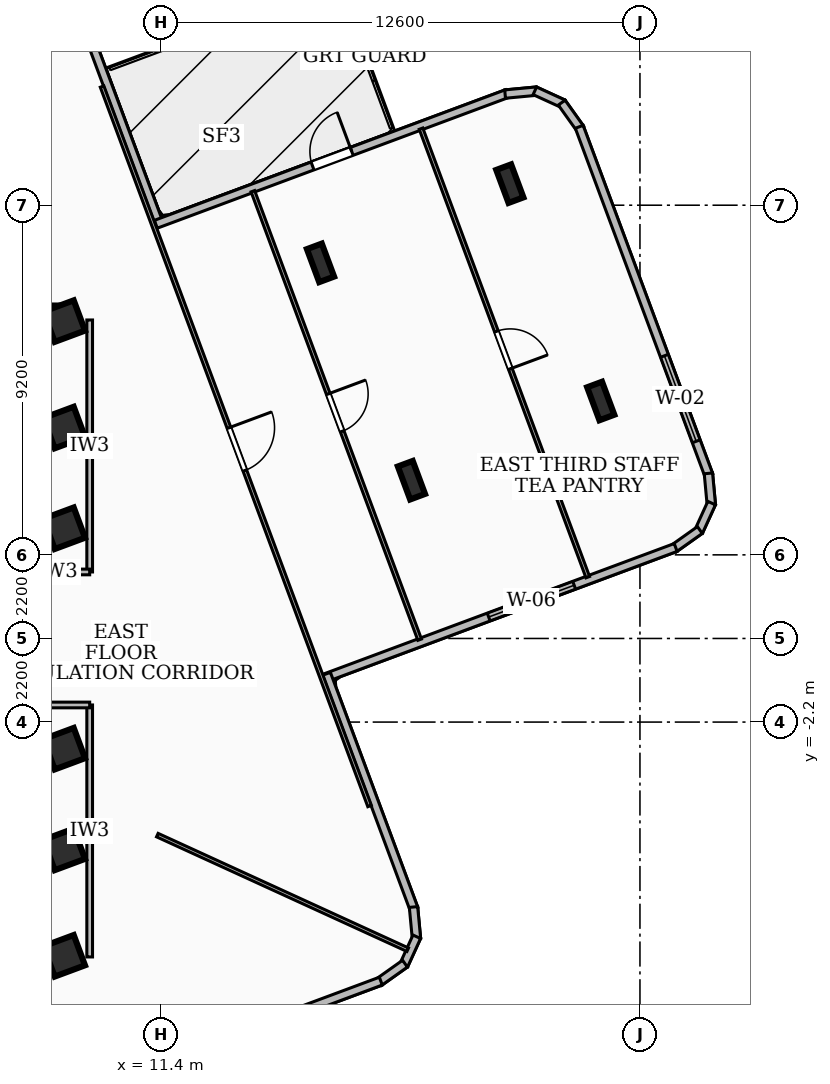
"""IFC4 building model, lengths in metres.
Left out: names, types, materials, properties, quantities, classifications, styles, units other than length and angle.
Written with IfcOpenShell. Run it as: python <this file> out.ifc"""

import sys

from ifc_helpers import new_model, si_unit, direction, frame, frame_2d, origin, origin_2d, place, context, subcontext, project, spatial, rectangle, i_section, extrude, element, fill, save


model = new_model("IFC4")
c1 = context("Model", 3, precision=1e-05, world=origin(), true_north=direction((0.0, 1.0)))
c2 = subcontext(c1, "Body", "Model", "MODEL_VIEW")
j1 = project(units=[si_unit("LENGTHUNIT", "METRE"), si_unit("PLANEANGLEUNIT", "RADIAN")], contexts=[c1])
p1 = place(None, origin())
s1 = spatial("IfcSite", under=j1, at=p1, CompositionType="ELEMENT")
p2 = place(p1, origin())
s2 = spatial("IfcBuilding", under=s1, at=p2, CompositionType="ELEMENT")
p3 = place(p2, frame((0.0, 0.0, 166.68)))
s3 = spatial("IfcBuildingStorey", under=s2, at=p3, CompositionType="ELEMENT", Elevation=166.68)
for number, where, z_axis, x_axis in (
    (1, (-8.78, 8.535, 0.0), (0.0, 0.0, 1.0), (1.0, 0.0, 0.0)),
    (2, (8.78, -8.535, 0.0), (0.0, 0.0, 1.0), (-1.0, 0.0, 0.0)),
):
    element("IfcWall", number, at=place(p3, frame(where, z_axis=z_axis, x_axis=x_axis)), inside=s3, PredefinedType="SHEAR", context=c2, shape_type="SweptSolid", body=[
        extrude(rectangle(XDim=17.56, YDim=0.45, at=frame_2d((8.78, 0.0))), origin(), (0.0, 0.0, 1.0), 3.34),
    ])
for number, where, z_axis, x_axis in (
    (3, (8.85, -5.55, 0.0), (0.0, 0.0, 1.0), (0.937, 0.349, 0.0)),
    (4, (8.85, -2.9, 0.0), (0.0, 0.0, 1.0), (0.937, 0.349, 0.0)),
    (5, (8.85, 2.9, 0.0), (0.0, 0.0, 1.0), (0.937, 0.349, 0.0)),
    (6, (8.85, 5.55, 0.0), (0.0, 0.0, 1.0), (0.937, 0.349, 0.0)),
    (7, (8.85, -8.35, 0.0), (0.0, 0.0, 1.0), (0.937, 0.349, 0.0)),
    (8, (8.85, 8.35, 0.0), (0.0, 0.0, 1.0), (0.937, 0.349, 0.0)),
):
    element("IfcColumn", number, at=place(p3, frame(where, z_axis=z_axis, x_axis=x_axis)), inside=s3, PredefinedType="COLUMN", context=c2, shape_type="SweptSolid", body=[
        extrude(rectangle(XDim=0.85, YDim=0.85, at=origin_2d()), origin(), (0.0, 0.0, 1.0), 3.6),
    ])
for number, where, z_axis, x_axis in (
    (9, (17.987, 4.164, 0.0), (0.0, 0.0, 1.0), (0.937, 0.349, 0.0)),
    (10, (15.594, 9.883, 0.0), (0.0, 0.0, 1.0), (0.937, 0.349, 0.0)),
    (11, (22.968, 6.248, 0.0), (0.0, 0.0, 1.0), (0.937, 0.349, 0.0)),
    (12, (20.576, 11.967, 0.0), (0.0, 0.0, 1.0), (0.937, 0.349, 0.0)),
):
    element("IfcColumn", number, at=place(p3, frame(where, z_axis=z_axis, x_axis=x_axis)), inside=s3, PredefinedType="COLUMN", context=c2, shape_type="SweptSolid", body=[
        extrude(i_section(OverallWidth=0.418, OverallDepth=0.927, WebThickness=0.019, FlangeThickness=0.032, at=origin_2d()), origin(), (0.0, 0.0, 1.0), 3.6),
    ])
p4 = place(p3, frame((9.016, 17.181, 0.0), z_axis=(0.0, 0.0, 1.0), x_axis=(0.34874699486, -0.937216908499, 0.0)))
e13 = element("IfcWall", 13, at=p4, inside=s3, PredefinedType="SOLIDWALL", context=c2, shape_type="SweptSolid", body=[
    extrude(rectangle(XDim=6.758, YDim=0.22, at=frame_2d((3.379, 0.0))), origin(), (0.0, 0.0, 1.0), 2.644),
])
p5 = place(p3, frame((11.26, 10.898, 0.0), z_axis=(0.0, 0.0, 1.0), x_axis=(0.937247074189, 0.348665917354, 0.0)))
e14 = element("IfcWall", 14, at=p5, inside=s3, PredefinedType="SOLIDWALL", context=c2, shape_type="SweptSolid", body=[
    extrude(rectangle(XDim=9.858, YDim=0.22, at=frame_2d((4.929, 0.0))), origin(), (0.0, 0.0, 1.0), 2.644),
])
p6 = place(p5, frame((4.4, 0.0, 0.0)))
e15 = element("IfcOpeningElement", 15, at=p6, cuts=e14, PredefinedType="OPENING", context=c2, shape_type="SweptSolid", body=[
    extrude(rectangle(XDim=1.1, YDim=2.1, at=frame_2d((0.55, 1.05))), frame((0.0, 0.12, 0.0), z_axis=(0.0, -1.0, 0.0), x_axis=(1.0, 0.0, 0.0)), (0.0, 0.0, 1.0), 0.24),
])
p7 = place(p3, frame((20.451, 14.324, 0.0), z_axis=(0.0, 0.0, 1.0), x_axis=(0.99561041007, 0.093594398126, 0.0)))
e16 = element("IfcWall", 16, at=p7, inside=s3, PredefinedType="SOLIDWALL", context=c2, shape_type="SweptSolid", body=[
    extrude(rectangle(XDim=0.835, YDim=0.22, at=frame_2d((0.417, 0.0))), origin(), (0.0, 0.0, 1.0), 3.34),
])
p8 = place(p3, frame((21.234, 14.41, 0.0), z_axis=(0.0, 0.0, 1.0), x_axis=(0.909384320786, -0.415956917371, 0.0)))
e17 = element("IfcWall", 17, at=p8, inside=s3, PredefinedType="SOLIDWALL", context=c2, shape_type="SweptSolid", body=[
    extrude(rectangle(XDim=0.819, YDim=0.22, at=frame_2d((0.41, 0.0))), origin(), (0.0, 0.0, 1.0), 3.34),
])
p9 = place(p3, frame((21.941, 14.099, 0.0), z_axis=(0.0, 0.0, 1.0), x_axis=(0.581210523844, -0.813753234693, 0.0)))
e18 = element("IfcWall", 18, at=p9, inside=s3, PredefinedType="SOLIDWALL", context=c2, shape_type="SweptSolid", body=[
    extrude(rectangle(XDim=0.835, YDim=0.22, at=frame_2d((0.417, 0.0))), origin(), (0.0, 0.0, 1.0), 3.34),
])
p10 = place(p3, frame((22.402, 13.463, 0.0), z_axis=(0.0, 0.0, 1.0), x_axis=(0.348638358175, -0.937257326037, 0.0)))
e19 = element("IfcWall", 19, at=p10, inside=s3, PredefinedType="SOLIDWALL", context=c2, shape_type="SweptSolid", body=[
    extrude(rectangle(XDim=9.781, YDim=0.22, at=frame_2d((4.89, 0.0))), origin(), (0.0, 0.0, 1.0), 3.34),
])
p11 = place(p10, frame((6.429, 0.0, 0.85)))
e20 = element("IfcOpeningElement", 20, at=p11, cuts=e19, PredefinedType="OPENING", context=c2, shape_type="SweptSolid", body=[
    extrude(rectangle(XDim=2.4, YDim=2.1, at=frame_2d((1.2, 1.05))), frame((0.0, 0.12, 0.0), z_axis=(0.0, -1.0, 0.0), x_axis=(1.0, 0.0, 0.0)), (0.0, 0.0, 1.0), 0.24),
])
p12 = place(p3, frame((25.801, 4.344, 0.0), z_axis=(0.0, 0.0, 1.0), x_axis=(0.09225198338, -0.995735693627, 0.0)))
e21 = element("IfcWall", 21, at=p12, inside=s3, PredefinedType="SOLIDWALL", context=c2, shape_type="SweptSolid", body=[
    extrude(rectangle(XDim=0.834, YDim=0.22, at=frame_2d((0.417, 0.0))), origin(), (0.0, 0.0, 1.0), 3.34),
])
p13 = place(p3, frame((25.886, 3.562, 0.0), z_axis=(0.0, 0.0, 1.0), x_axis=(-0.41476734413, -0.909927497245, 0.0)))
e22 = element("IfcWall", 22, at=p13, inside=s3, PredefinedType="SOLIDWALL", context=c2, shape_type="SweptSolid", body=[
    extrude(rectangle(XDim=0.82, YDim=0.22, at=frame_2d((0.41, 0.0))), origin(), (0.0, 0.0, 1.0), 3.34),
])
p14 = place(p3, frame((25.576, 2.853, 0.0), z_axis=(0.0, 0.0, 1.0), x_axis=(-0.815453569677, -0.578822490666, 0.0)))
e23 = element("IfcWall", 23, at=p14, inside=s3, PredefinedType="SOLIDWALL", context=c2, shape_type="SweptSolid", body=[
    extrude(rectangle(XDim=0.833, YDim=0.22, at=frame_2d((0.416, 0.0))), origin(), (0.0, 0.0, 1.0), 3.34),
])
p15 = place(p3, frame((24.94, 2.394, 0.0), z_axis=(0.0, 0.0, 1.0), x_axis=(-0.937259115868, -0.348633546468, 0.0)))
e24 = element("IfcWall", 24, at=p15, inside=s3, PredefinedType="SOLIDWALL", context=c2, shape_type="SweptSolid", body=[
    extrude(rectangle(XDim=9.859, YDim=0.22, at=frame_2d((4.929, 0.0))), origin(), (0.0, 0.0, 1.0), 3.34),
])
p16 = place(p15, frame((2.85, 0.0, 0.85)))
e25 = element("IfcOpeningElement", 25, at=p16, cuts=e24, PredefinedType="OPENING", context=c2, shape_type="SweptSolid", body=[
    extrude(rectangle(XDim=2.4, YDim=1.85, at=frame_2d((1.2, 0.925))), frame((0.0, 0.12, 0.0), z_axis=(0.0, -1.0, 0.0), x_axis=(1.0, 0.0, 0.0)), (0.0, 0.0, 1.0), 0.24),
])
p17 = place(p3, frame((15.751, -0.93, 0.0), z_axis=(0.0, 0.0, 1.0), x_axis=(0.348729932868, -0.937223257246, 0.0)))
e26 = element("IfcWall", 26, at=p17, inside=s3, PredefinedType="SOLIDWALL", context=c2, shape_type="SweptSolid", body=[
    extrude(rectangle(XDim=6.598, YDim=0.22, at=frame_2d((3.299, 0.0))), origin(), (0.0, 0.0, 1.0), 3.34),
])
p18 = place(p3, frame((18.041, -7.066, 0.0), z_axis=(0.0, 0.0, 1.0), x_axis=(0.09330446586, -0.995637623159, 0.0)))
e27 = element("IfcWall", 27, at=p18, inside=s3, PredefinedType="SOLIDWALL", context=c2, shape_type="SweptSolid", body=[
    extrude(rectangle(XDim=0.835, YDim=0.22, at=frame_2d((0.417, 0.0))), origin(), (0.0, 0.0, 1.0), 3.34),
])
p19 = place(p3, frame((18.127, -7.849, 0.0), z_axis=(0.0, 0.0, 1.0), x_axis=(-0.415083126143, -0.909783489843, 0.0)))
e28 = element("IfcWall", 28, at=p19, inside=s3, PredefinedType="SOLIDWALL", context=c2, shape_type="SweptSolid", body=[
    extrude(rectangle(XDim=0.819, YDim=0.22, at=frame_2d((0.409, 0.0))), origin(), (0.0, 0.0, 1.0), 3.34),
])
p20 = place(p3, frame((17.817, -8.557, 0.0), z_axis=(0.0, 0.0, 1.0), x_axis=(-0.815315167698, -0.579017424022, 0.0)))
e29 = element("IfcWall", 29, at=p20, inside=s3, PredefinedType="SOLIDWALL", context=c2, shape_type="SweptSolid", body=[
    extrude(rectangle(XDim=0.833, YDim=0.22, at=frame_2d((0.417, 0.0))), origin(), (0.0, 0.0, 1.0), 3.34),
])
p21 = place(p3, frame((17.181, -9.016, 0.0), z_axis=(0.0, 0.0, 1.0), x_axis=(-0.937216908499, -0.34874699486, 0.0)))
e30 = element("IfcWall", 30, at=p21, inside=s3, PredefinedType="SOLIDWALL", context=c2, shape_type="SweptSolid", body=[
    extrude(rectangle(XDim=6.758, YDim=0.22, at=frame_2d((3.379, 0.0))), origin(), (0.0, 0.0, 1.0), 3.34),
])
p22 = place(p3, frame((9.52, 1.75, 0.0), z_axis=(0.0, 0.0, 1.0), x_axis=(0.0, 1.0, 0.0)))
e31 = element("IfcWall", 31, at=p22, inside=s3, PredefinedType="PARTITIONING", context=c2, shape_type="SweptSolid", body=[
    extrude(rectangle(XDim=6.63, YDim=0.15, at=frame_2d((3.315, 0.0))), origin(), (0.0, 0.0, 1.0), 2.644),
])
p23 = place(p3, frame((7.85, 1.75, 0.0), z_axis=(0.0, 0.0, 1.0), x_axis=(1.0, 0.0, 0.0)))
e32 = element("IfcWall", 32, at=p23, inside=s3, PredefinedType="PARTITIONING", context=c2, shape_type="SweptSolid", body=[
    extrude(rectangle(XDim=1.67, YDim=0.15, at=frame_2d((0.835, 0.0))), origin(), (0.0, 0.0, 1.0), 2.57),
])
p24 = place(p3, frame((9.52, -8.38, 0.0), z_axis=(0.0, 0.0, 1.0), x_axis=(0.0, 1.0, 0.0)))
e33 = element("IfcWall", 33, at=p24, inside=s3, PredefinedType="PARTITIONING", context=c2, shape_type="SweptSolid", body=[
    extrude(rectangle(XDim=6.63, YDim=0.15, at=frame_2d((3.315, 0.0))), origin(), (0.0, 0.0, 1.0), 3.34),
])
p25 = place(p3, frame((7.85, -1.75, 0.0), z_axis=(0.0, 0.0, 1.0), x_axis=(1.0, 0.0, 0.0)))
e34 = element("IfcWall", 34, at=p25, inside=s3, PredefinedType="PARTITIONING", context=c2, shape_type="SweptSolid", body=[
    extrude(rectangle(XDim=1.67, YDim=0.15, at=frame_2d((0.835, 0.0))), origin(), (0.0, 0.0, 1.0), 2.57),
])
p26 = place(p3, frame((11.3, -5.174, 0.0), z_axis=(0.0, 0.0, 1.0), x_axis=(0.909275268701, -0.416195249528, 0.0)))
e35 = element("IfcWall", 35, at=p26, inside=s3, PredefinedType="PARTITIONING", context=c2, shape_type="SweptSolid", body=[
    extrude(rectangle(XDim=7.246, YDim=0.1, at=frame_2d((3.623, 0.0))), origin(), (0.0, 0.0, 1.0), 3.34),
])
p27 = place(p3, frame((9.846, 14.522, 0.0), z_axis=(0.0, 0.0, 1.0), x_axis=(0.348543090668, -0.937292757866, 0.0)))
e36 = element("IfcWall", 36, at=p27, inside=s3, PredefinedType="PARTITIONING", context=c2, shape_type="SweptSolid", body=[
    extrude(rectangle(XDim=20.198, YDim=0.1, at=frame_2d((10.099, 0.0))), origin(), (0.0, 0.0, 1.0), 2.644),
])
p28 = place(p27, frame((9.579, 0.0, 0.0)))
e37 = element("IfcOpeningElement", 37, at=p28, cuts=e36, PredefinedType="OPENING", context=c2, shape_type="SweptSolid", body=[
    extrude(rectangle(XDim=1.2, YDim=2.1, at=frame_2d((0.6, 1.05))), frame((0.0, 0.06, 0.0), z_axis=(0.0, -1.0, 0.0), x_axis=(1.0, 0.0, 0.0)), (0.0, 0.0, 1.0), 0.12),
])
p29 = place(p3, frame((13.814, 11.768, 0.0), z_axis=(0.0, 0.0, 1.0), x_axis=(0.348608135993, -0.937268567445, 0.0)))
e38 = element("IfcWall", 38, at=p29, inside=s3, PredefinedType="PARTITIONING", context=c2, shape_type="SweptSolid", body=[
    extrude(rectangle(XDim=12.59, YDim=0.1, at=frame_2d((6.295, 0.0))), origin(), (0.0, 0.0, 1.0), 2.644),
])
p30 = place(p29, frame((5.69, 0.0, 0.0)))
e39 = element("IfcOpeningElement", 39, at=p30, cuts=e38, PredefinedType="OPENING", context=c2, shape_type="SweptSolid", body=[
    extrude(rectangle(XDim=1.05, YDim=2.08, at=frame_2d((0.525, 1.04))), frame((0.0, 0.06, 0.0), z_axis=(0.0, -1.0, 0.0), x_axis=(1.0, 0.0, 0.0)), (0.0, 0.0, 1.0), 0.12),
])
p31 = place(p3, frame((18.239, 13.414, 0.0), z_axis=(0.0, 0.0, 1.0), x_axis=(0.348514653153, -0.937303332192, 0.0)))
e40 = element("IfcWall", 40, at=p31, inside=s3, PredefinedType="PARTITIONING", context=c2, shape_type="SweptSolid", body=[
    extrude(rectangle(XDim=12.59, YDim=0.1, at=frame_2d((6.295, 0.0))), origin(), (0.0, 0.0, 1.0), 2.644),
])
p32 = place(p31, frame((5.691, 0.0, 0.0)))
e41 = element("IfcOpeningElement", 41, at=p32, cuts=e40, PredefinedType="OPENING", context=c2, shape_type="SweptSolid", body=[
    extrude(rectangle(XDim=1.05, YDim=2.08, at=frame_2d((0.525, 1.04))), frame((0.0, 0.06, 0.0), z_axis=(0.0, -1.0, 0.0), x_axis=(1.0, 0.0, 0.0)), (0.0, 0.0, 1.0), 0.12),
])
p33 = place(p6, origin())
e42 = element("IfcDoor", 42, at=p33, inside=s3, OperationType="SINGLE_SWING_RIGHT", PredefinedType="DOOR", context=c2, shape_type="SweptSolid", body=[
    extrude(rectangle(XDim=1.1, YDim=2.1, at=frame_2d((0.55, 1.05))), frame((0.0, 0.025, 0.0), z_axis=(0.0, -1.0, 0.0), x_axis=(1.0, 0.0, 0.0)), (0.0, 0.0, 1.0), 0.05),
])
fill(e15, e42)
p34 = place(p11, origin())
e43 = element("IfcWindow", 43, at=p34, inside=s3, PartitioningType="SINGLE_PANEL", PredefinedType="WINDOW", context=c2, shape_type="SweptSolid", body=[
    extrude(rectangle(XDim=2.4, YDim=2.1, at=frame_2d((1.2, 1.05))), frame((0.0, 0.03, 0.0), z_axis=(0.0, -1.0, 0.0), x_axis=(1.0, 0.0, 0.0)), (0.0, 0.0, 1.0), 0.06),
])
fill(e20, e43)
p35 = place(p16, origin())
e44 = element("IfcWindow", 44, at=p35, inside=s3, PartitioningType="SINGLE_PANEL", PredefinedType="WINDOW", context=c2, shape_type="SweptSolid", body=[
    extrude(rectangle(XDim=2.4, YDim=1.85, at=frame_2d((1.2, 0.925))), frame((0.0, 0.03, 0.0), z_axis=(0.0, -1.0, 0.0), x_axis=(1.0, 0.0, 0.0)), (0.0, 0.0, 1.0), 0.06),
])
fill(e25, e44)
p36 = place(p28, origin())
e45 = element("IfcDoor", 45, at=p36, inside=s3, OperationType="SINGLE_SWING_LEFT", PredefinedType="DOOR", context=c2, shape_type="SweptSolid", body=[
    extrude(rectangle(XDim=1.2, YDim=2.1, at=frame_2d((0.6, 1.05))), frame((0.0, 0.025, 0.0), z_axis=(0.0, -1.0, 0.0), x_axis=(1.0, 0.0, 0.0)), (0.0, 0.0, 1.0), 0.05),
])
fill(e37, e45)
p37 = place(p30, origin())
e46 = element("IfcDoor", 46, at=p37, inside=s3, OperationType="SINGLE_SWING_LEFT", PredefinedType="DOOR", context=c2, shape_type="SweptSolid", body=[
    extrude(rectangle(XDim=1.05, YDim=2.08, at=frame_2d((0.525, 1.04))), frame((0.0, 0.025, 0.0), z_axis=(0.0, -1.0, 0.0), x_axis=(1.0, 0.0, 0.0)), (0.0, 0.0, 1.0), 0.05),
])
fill(e39, e46)
p38 = place(p32, origin())
e47 = element("IfcDoor", 47, at=p38, inside=s3, OperationType="SINGLE_SWING_RIGHT", PredefinedType="DOOR", context=c2, shape_type="SweptSolid", body=[
    extrude(rectangle(XDim=1.05, YDim=2.08, at=frame_2d((0.525, 1.04))), frame((0.0, 0.025, 0.0), z_axis=(0.0, -1.0, 0.0), x_axis=(1.0, 0.0, 0.0)), (0.0, 0.0, 1.0), 0.05),
])
fill(e41, e47)
save(model, sys.argv[1])
